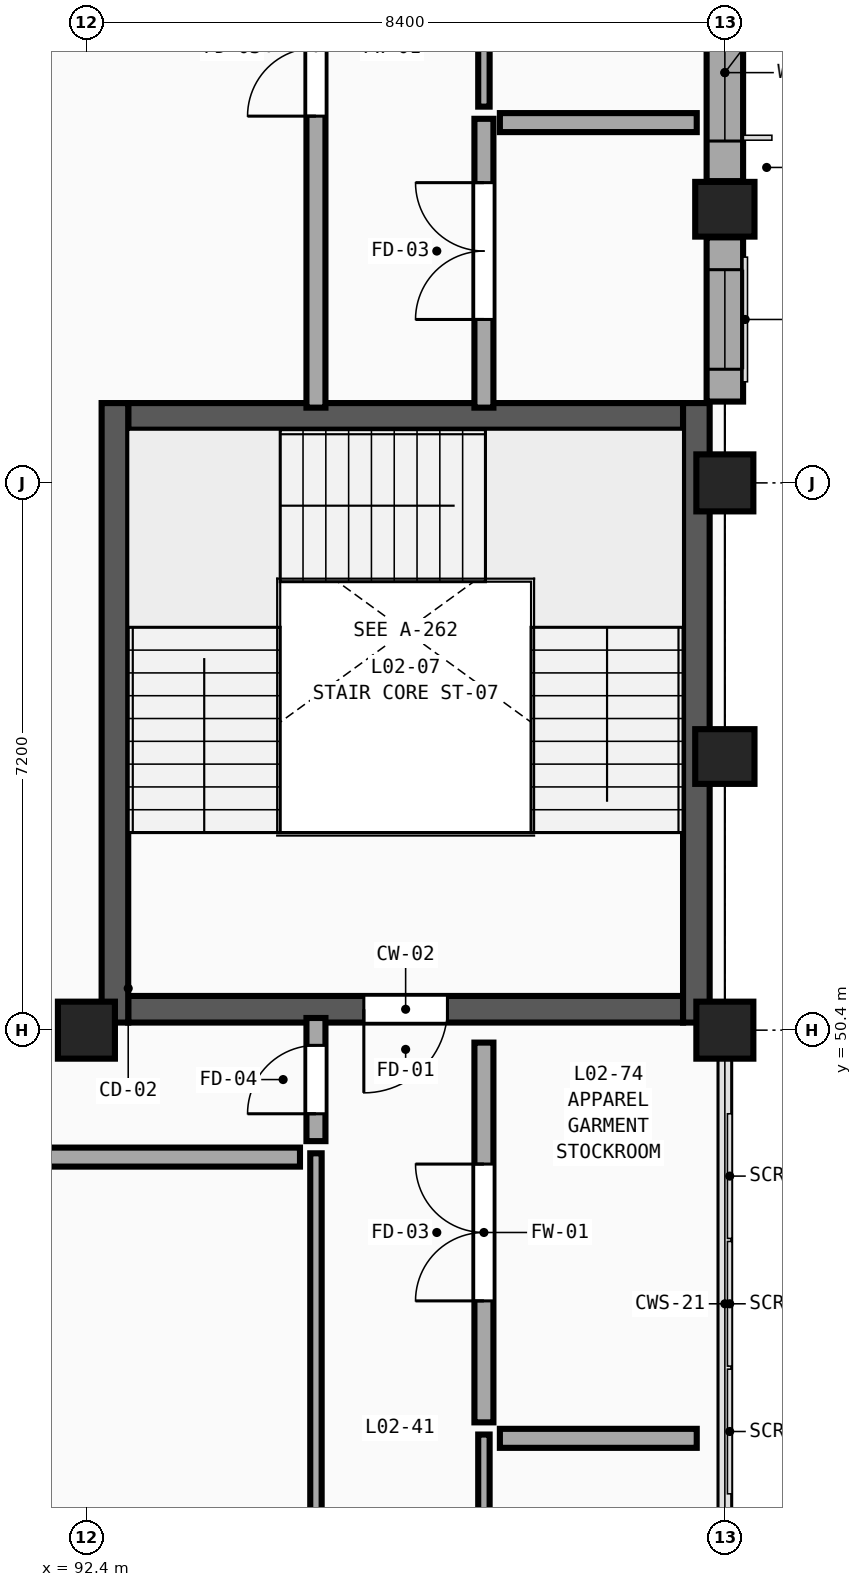
"""IFC4 building model, lengths in metres.
Left out: names, types, materials, properties, quantities, classifications, styles, units other than length and angle.
Written with IfcOpenShell. Run it as: python <this file> out.ifc"""

import sys

from ifc_helpers import new_model, si_unit, direction, frame, frame_2d, origin, origin_2d, place, context, subcontext, project, spatial, rectangle, circle, extrude, element, fill, save


model = new_model("IFC4")
c1 = context("Model", 3, precision=1e-05, world=origin(), true_north=direction((0.0, 1.0)))
c2 = subcontext(c1, "Body", "Model", "MODEL_VIEW")
j1 = project(units=[si_unit("LENGTHUNIT", "METRE"), si_unit("PLANEANGLEUNIT", "RADIAN")], contexts=[c1])
p1 = place(None, origin())
s1 = spatial("IfcSite", under=j1, at=p1, CompositionType="ELEMENT")
p2 = place(p1, origin())
s2 = spatial("IfcBuilding", under=s1, at=p2, CompositionType="ELEMENT")
p3 = place(p2, frame((0.0, 0.0, 9.9)))
s3 = spatial("IfcBuildingStorey", under=s2, at=p3, CompositionType="ELEMENT", Elevation=9.9)
for number, where, z_axis, x_axis in (
    (1, (100.8, 50.4, 0.0), (0.0, 0.0, 1.0), (1.0, 0.0, 0.0)),
    (2, (100.8, 57.6, 0.0), (0.0, 0.0, 1.0), (1.0, 0.0, 0.0)),
):
    element("IfcColumn", number, at=place(p3, frame(where, z_axis=z_axis, x_axis=x_axis)), inside=s3, PredefinedType="COLUMN", context=c2, shape_type="SweptSolid", body=[
        extrude(rectangle(XDim=0.75, YDim=0.75, at=origin_2d()), origin(), (0.0, 0.0, 1.0), 4.5),
    ])
for number, where, z_axis, x_axis in (
    (3, (100.8, 54.0, 0.0), (0.0, 0.0, 1.0), (1.0, 0.0, 0.0)),
    (4, (100.8, 61.2, 0.0), (0.0, 0.0, 1.0), (1.0, 0.0, 0.0)),
):
    element("IfcColumn", number, at=place(p3, frame(where, z_axis=z_axis, x_axis=x_axis)), inside=s3, PredefinedType="PILASTER", context=c2, shape_type="SweptSolid", body=[
        extrude(rectangle(XDim=0.78, YDim=0.72, at=origin_2d()), origin(), (0.0, 0.0, 1.0), 4.5),
    ])
p4 = place(p3, frame((92.4, 50.4, 0.0), z_axis=(0.0, 0.0, 1.0), x_axis=(1.0, 0.0, 0.0)))
e5 = element("IfcColumn", 5, at=p4, inside=s3, PredefinedType="COLUMN", context=c2, shape_type="SweptSolid", body=[
    extrude(circle(Radius=0.375, at=origin_2d()), origin(), (0.0, 0.0, 1.0), 4.5),
])
p5 = place(p3, frame((100.8, 64.425, 0.0), z_axis=(0.0, 0.0, 1.0), x_axis=(0.0, -1.0, 0.0)))
e6 = element("IfcWall", 6, at=p5, inside=s3, PredefinedType="SOLIDWALL", context=c2, shape_type="SweptSolid", body=[
    extrude(rectangle(XDim=2.855, YDim=0.48, at=frame_2d((1.427, 0.0))), origin(), (0.0, 0.0, 1.0), 3.63),
])
p6 = place(p5, frame((0.528, 0.0, 0.75)))
e7 = element("IfcOpeningElement", 7, at=p6, cuts=e6, PredefinedType="OPENING", context=c2, shape_type="SweptSolid", body=[
    extrude(rectangle(XDim=1.8, YDim=2.62, at=frame_2d((0.9, 1.31))), frame((0.0, 0.26, 0.0), z_axis=(0.0, -1.0, 0.0), x_axis=(1.0, 0.0, 0.0)), (0.0, 0.0, 1.0), 0.52),
])
p7 = place(p3, frame((100.8, 60.83, 0.0), z_axis=(0.0, 0.0, 1.0), x_axis=(0.0, -1.0, 0.0)))
e8 = element("IfcWall", 8, at=p7, inside=s3, PredefinedType="SOLIDWALL", context=c2, shape_type="SweptSolid", body=[
    extrude(rectangle(XDim=2.16, YDim=0.48, at=frame_2d((1.08, 0.0))), origin(), (0.0, 0.0, 1.0), 3.63),
])
p8 = place(p7, frame((0.425, 0.0, 0.75)))
e9 = element("IfcOpeningElement", 9, at=p8, cuts=e8, PredefinedType="OPENING", context=c2, shape_type="SweptSolid", body=[
    extrude(rectangle(XDim=1.31, YDim=2.62, at=frame_2d((0.655, 1.31))), frame((0.0, 0.26, 0.0), z_axis=(0.0, -1.0, 0.0), x_axis=(1.0, 0.0, 0.0)), (0.0, 0.0, 1.0), 0.52),
])
p9 = place(p3, frame((100.25, 50.675, 0.0), z_axis=(0.0, 0.0, 1.0), x_axis=(-1.0, 0.0, 0.0)))
e10 = element("IfcWall", 10, at=p9, inside=s3, PredefinedType="SHEAR", context=c2, shape_type="SweptSolid", body=[
    extrude(rectangle(XDim=7.3, YDim=0.35, at=frame_2d((3.65, 0.0))), origin(), (0.0, 0.0, 1.0), 4.5),
])
p10 = place(p9, frame((3.1, 0.0, 0.0)))
e11 = element("IfcOpeningElement", 11, at=p10, cuts=e10, PredefinedType="OPENING", context=c2, shape_type="SweptSolid", body=[
    extrude(rectangle(XDim=1.1, YDim=2.2, at=frame_2d((0.55, 1.1))), frame((0.0, 0.195, 0.0), z_axis=(0.0, -1.0, 0.0), x_axis=(1.0, 0.0, 0.0)), (0.0, 0.0, 1.0), 0.39),
])
p11 = place(p3, frame((92.95, 58.475, 0.0), z_axis=(0.0, 0.0, 1.0), x_axis=(1.0, 0.0, 0.0)))
e12 = element("IfcWall", 12, at=p11, inside=s3, PredefinedType="SHEAR", context=c2, shape_type="SweptSolid", body=[
    extrude(rectangle(XDim=7.3, YDim=0.35, at=frame_2d((3.65, 0.0))), origin(), (0.0, 0.0, 1.0), 4.5),
])
for number, where, z_axis, x_axis in (
    (13, (92.775, 58.65, 0.0), (0.0, 0.0, 1.0), (0.0, -1.0, 0.0)),
    (14, (100.425, 50.5, 0.0), (0.0, 0.0, 1.0), (0.0, 1.0, 0.0)),
):
    element("IfcWall", number, at=place(p3, frame(where, z_axis=z_axis, x_axis=x_axis)), inside=s3, PredefinedType="SHEAR", context=c2, shape_type="SweptSolid", body=[
        extrude(rectangle(XDim=8.15, YDim=0.35, at=frame_2d((4.075, 0.0))), origin(), (0.0, 0.0, 1.0), 4.5),
    ])
p12 = place(p3, frame((95.42, 36.37, 0.0), z_axis=(0.0, 0.0, 1.0), x_axis=(0.0, 1.0, 0.0)))
e15 = element("IfcWall", 15, at=p12, inside=s3, PredefinedType="PARTITIONING", context=c2, shape_type="SweptSolid", body=[
    extrude(rectangle(XDim=12.41, YDim=0.15, at=frame_2d((6.205, 0.0))), origin(), (0.0, 0.0, 1.0), 4.18),
])
p13 = place(p12, frame((5.365, 0.0, 0.0)))
e16 = element("IfcOpeningElement", 16, at=p13, cuts=e15, PredefinedType="OPENING", context=c2, shape_type="SweptSolid", body=[
    extrude(rectangle(XDim=1.68, YDim=2.29, at=frame_2d((0.84, 1.145))), frame((0.0, 0.095, 0.0), z_axis=(0.0, -1.0, 0.0), x_axis=(1.0, 0.0, 0.0)), (0.0, 0.0, 1.0), 0.19),
])
p14 = place(p3, frame((95.42, 58.59, 0.0), z_axis=(0.0, 0.0, 1.0), x_axis=(0.0, 1.0, 0.0)))
e17 = element("IfcWall", 17, at=p14, inside=s3, PredefinedType="SOLIDWALL", context=c2, shape_type="SweptSolid", body=[
    extrude(rectangle(XDim=9.47, YDim=0.25, at=frame_2d((4.735, 0.0))), origin(), (0.0, 0.0, 1.0), 4.18),
])
p15 = place(p14, frame((3.835, 0.0, 0.0)))
e18 = element("IfcOpeningElement", 18, at=p15, cuts=e17, PredefinedType="OPENING", context=c2, shape_type="SweptSolid", body=[
    extrude(rectangle(XDim=1.8, YDim=2.3, at=frame_2d((0.9, 1.15))), frame((0.0, 0.145, 0.0), z_axis=(0.0, -1.0, 0.0), x_axis=(1.0, 0.0, 0.0)), (0.0, 0.0, 1.0), 0.29),
])
p16 = place(p3, frame((97.63, 36.37, 0.0), z_axis=(0.0, 0.0, 1.0), x_axis=(0.0, 1.0, 0.0)))
e19 = element("IfcWall", 19, at=p16, inside=s3, PredefinedType="PARTITIONING", context=c2, shape_type="SweptSolid", body=[
    extrude(rectangle(XDim=8.71, YDim=0.15, at=frame_2d((4.355, 0.0))), origin(), (0.0, 0.0, 1.0), 4.18),
])
p17 = place(p16, frame((3.755, 0.0, 0.0)))
e20 = element("IfcOpeningElement", 20, at=p17, cuts=e19, PredefinedType="OPENING", context=c2, shape_type="SweptSolid", body=[
    extrude(rectangle(XDim=1.2, YDim=2.37, at=frame_2d((0.6, 1.185))), frame((0.0, 0.095, 0.0), z_axis=(0.0, -1.0, 0.0), x_axis=(1.0, 0.0, 0.0)), (0.0, 0.0, 1.0), 0.19),
])
p18 = place(p3, frame((97.63, 62.55, 0.0), z_axis=(0.0, 0.0, 1.0), x_axis=(0.0, 1.0, 0.0)))
e21 = element("IfcWall", 21, at=p18, inside=s3, PredefinedType="PARTITIONING", context=c2, shape_type="SweptSolid", body=[
    extrude(rectangle(XDim=5.51, YDim=0.15, at=frame_2d((2.755, 0.0))), origin(), (0.0, 0.0, 1.0), 4.18),
])
p19 = place(p18, frame((2.155, 0.0, 0.0)))
e22 = element("IfcOpeningElement", 22, at=p19, cuts=e21, PredefinedType="OPENING", context=c2, shape_type="SweptSolid", body=[
    extrude(rectangle(XDim=1.2, YDim=2.45, at=frame_2d((0.6, 1.225))), frame((0.0, 0.095, 0.0), z_axis=(0.0, -1.0, 0.0), x_axis=(1.0, 0.0, 0.0)), (0.0, 0.0, 1.0), 0.19),
])
p20 = place(p3, frame((97.63, 45.24, 0.0), z_axis=(0.0, 0.0, 1.0), x_axis=(0.0, 1.0, 0.0)))
e23 = element("IfcWall", 23, at=p20, inside=s3, PredefinedType="SOLIDWALL", context=c2, shape_type="SweptSolid", body=[
    extrude(rectangle(XDim=4.996, YDim=0.25, at=frame_2d((2.498, 0.0))), origin(), (0.0, 0.0, 1.0), 4.18),
])
p21 = place(p20, frame((1.598, 0.0, 0.0)))
e24 = element("IfcOpeningElement", 24, at=p21, cuts=e23, PredefinedType="OPENING", context=c2, shape_type="SweptSolid", body=[
    extrude(rectangle(XDim=1.8, YDim=2.3, at=frame_2d((0.9, 1.15))), frame((0.0, 0.145, 0.0), z_axis=(0.0, -1.0, 0.0), x_axis=(1.0, 0.0, 0.0)), (0.0, 0.0, 1.0), 0.29),
])
p22 = place(p3, frame((97.63, 58.59, 0.0), z_axis=(0.0, 0.0, 1.0), x_axis=(0.0, 1.0, 0.0)))
e25 = element("IfcWall", 25, at=p22, inside=s3, PredefinedType="SOLIDWALL", context=c2, shape_type="SweptSolid", body=[
    extrude(rectangle(XDim=3.8, YDim=0.25, at=frame_2d((1.9, 0.0))), origin(), (0.0, 0.0, 1.0), 4.18),
])
p23 = place(p22, frame((1.16, 0.0, 0.0)))
e26 = element("IfcOpeningElement", 26, at=p23, cuts=e25, PredefinedType="OPENING", context=c2, shape_type="SweptSolid", body=[
    extrude(rectangle(XDim=1.8, YDim=2.3, at=frame_2d((0.9, 1.15))), frame((0.0, 0.145, 0.0), z_axis=(0.0, -1.0, 0.0), x_axis=(1.0, 0.0, 0.0)), (0.0, 0.0, 1.0), 0.29),
])
p24 = place(p3, frame((95.42, 48.94, 0.0), z_axis=(0.0, 0.0, 1.0), x_axis=(0.0, 1.0, 0.0)))
e27 = element("IfcWall", 27, at=p24, inside=s3, PredefinedType="SOLIDWALL", context=c2, shape_type="SweptSolid", body=[
    extrude(rectangle(XDim=1.62, YDim=0.25, at=frame_2d((0.81, 0.0))), origin(), (0.0, 0.0, 1.0), 4.18),
])
p25 = place(p24, frame((0.36, 0.0, 0.0)))
e28 = element("IfcOpeningElement", 28, at=p25, cuts=e27, PredefinedType="OPENING", context=c2, shape_type="SweptSolid", body=[
    extrude(rectangle(XDim=0.9, YDim=2.1, at=frame_2d((0.45, 1.05))), frame((0.0, 0.145, 0.0), z_axis=(0.0, -1.0, 0.0), x_axis=(1.0, 0.0, 0.0)), (0.0, 0.0, 1.0), 0.29),
])
p26 = place(p3, frame((86.216, 48.73, 0.0), z_axis=(0.0, 0.0, 1.0), x_axis=(1.0, 0.0, 0.0)))
e29 = element("IfcWall", 29, at=p26, inside=s3, PredefinedType="SOLIDWALL", context=c2, shape_type="SweptSolid", body=[
    extrude(rectangle(XDim=8.994, YDim=0.25, at=frame_2d((4.497, 0.0))), origin(), (0.0, 0.0, 1.0), 4.18),
])
for number, where, z_axis, x_axis in (
    (30, (97.84, 45.03, 0.0), (0.0, 0.0, 1.0), (1.0, 0.0, 0.0)),
    (31, (97.84, 62.34, 0.0), (0.0, 0.0, 1.0), (1.0, 0.0, 0.0)),
):
    element("IfcWall", number, at=place(p3, frame(where, z_axis=z_axis, x_axis=x_axis)), inside=s3, PredefinedType="SOLIDWALL", context=c2, shape_type="SweptSolid", body=[
        extrude(rectangle(XDim=2.59, YDim=0.25, at=frame_2d((1.295, 0.0))), origin(), (0.0, 0.0, 1.0), 4.18),
    ])
p27 = place(p6, origin())
e32 = element("IfcWindow", 32, at=p27, inside=s3, PartitioningType="DOUBLE_PANEL_VERTICAL", PredefinedType="WINDOW", context=c2, shape_type="SweptSolid", body=[
    extrude(rectangle(XDim=1.8, YDim=2.62, at=frame_2d((0.9, 1.31))), frame((0.0, 0.03, 0.0), z_axis=(0.0, -1.0, 0.0), x_axis=(1.0, 0.0, 0.0)), (0.0, 0.0, 1.0), 0.06),
])
fill(e7, e32)
p28 = place(p8, origin())
e33 = element("IfcWindow", 33, at=p28, inside=s3, PartitioningType="TRIPLE_PANEL_VERTICAL", PredefinedType="WINDOW", context=c2, shape_type="SweptSolid", body=[
    extrude(rectangle(XDim=1.31, YDim=2.62, at=frame_2d((0.655, 1.31))), frame((0.0, 0.03, 0.0), z_axis=(0.0, -1.0, 0.0), x_axis=(1.0, 0.0, 0.0)), (0.0, 0.0, 1.0), 0.06),
])
fill(e9, e33)
p29 = place(p10, origin())
e34 = element("IfcDoor", 34, at=p29, inside=s3, OperationType="SINGLE_SWING_RIGHT", PredefinedType="DOOR", context=c2, shape_type="SweptSolid", body=[
    extrude(rectangle(XDim=1.1, YDim=2.2, at=frame_2d((0.55, 1.1))), frame((0.0, 0.025, 0.0), z_axis=(0.0, -1.0, 0.0), x_axis=(1.0, 0.0, 0.0)), (0.0, 0.0, 1.0), 0.05),
])
fill(e11, e34)
p30 = place(p15, origin())
e35 = element("IfcDoor", 35, at=p30, inside=s3, OperationType="DOUBLE_DOOR_SINGLE_SWING", PredefinedType="DOOR", context=c2, shape_type="SweptSolid", body=[
    extrude(rectangle(XDim=1.8, YDim=2.3, at=frame_2d((0.9, 1.15))), frame((0.0, 0.025, 0.0), z_axis=(0.0, -1.0, 0.0), x_axis=(1.0, 0.0, 0.0)), (0.0, 0.0, 1.0), 0.05),
])
fill(e18, e35)
p31 = place(p21, origin())
e36 = element("IfcDoor", 36, at=p31, inside=s3, OperationType="DOUBLE_DOOR_SINGLE_SWING", PredefinedType="DOOR", context=c2, shape_type="SweptSolid", body=[
    extrude(rectangle(XDim=1.8, YDim=2.3, at=frame_2d((0.9, 1.15))), frame((0.0, 0.025, 0.0), z_axis=(0.0, -1.0, 0.0), x_axis=(1.0, 0.0, 0.0)), (0.0, 0.0, 1.0), 0.05),
])
fill(e24, e36)
p32 = place(p23, origin())
e37 = element("IfcDoor", 37, at=p32, inside=s3, OperationType="DOUBLE_DOOR_SINGLE_SWING", PredefinedType="DOOR", context=c2, shape_type="SweptSolid", body=[
    extrude(rectangle(XDim=1.8, YDim=2.3, at=frame_2d((0.9, 1.15))), frame((0.0, 0.025, 0.0), z_axis=(0.0, -1.0, 0.0), x_axis=(1.0, 0.0, 0.0)), (0.0, 0.0, 1.0), 0.05),
])
fill(e26, e37)
p33 = place(p25, origin())
e38 = element("IfcDoor", 38, at=p33, inside=s3, OperationType="SINGLE_SWING_LEFT", PredefinedType="DOOR", context=c2, shape_type="SweptSolid", body=[
    extrude(rectangle(XDim=0.9, YDim=2.1, at=frame_2d((0.45, 1.05))), frame((0.0, 0.025, 0.0), z_axis=(0.0, -1.0, 0.0), x_axis=(1.0, 0.0, 0.0)), (0.0, 0.0, 1.0), 0.05),
])
fill(e28, e38)
save(model, sys.argv[1])
